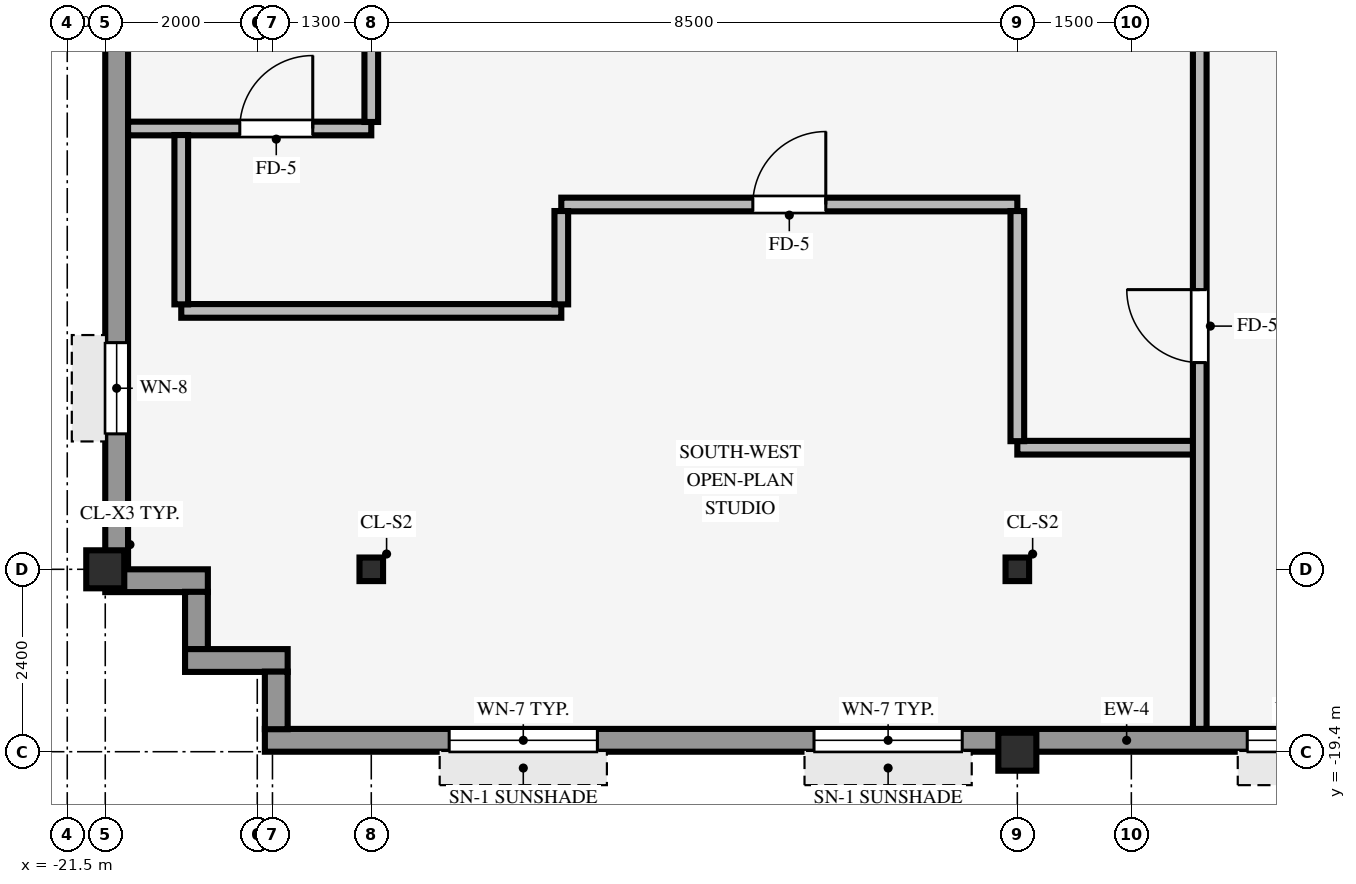
"""IFC4 building model, lengths in metres.
Left out: names, types, materials, properties, quantities, classifications, styles, units other than length and angle.
Written with IfcOpenShell. Run it as: python <this file> out.ifc"""

import sys

from ifc_helpers import new_model, si_unit, direction, frame, frame_2d, origin, origin_2d, place, context, subcontext, project, spatial, rectangle, hollow_rectangle, i_section, extrude, source, transform, mapped, element, fill, save


model = new_model("IFC4")
c1 = context("Model", 3, precision=1e-05, world=origin(), true_north=direction((0.0, 1.0)))
c2 = subcontext(c1, "Body", "Model", "MODEL_VIEW")
j1 = project(units=[si_unit("LENGTHUNIT", "METRE"), si_unit("PLANEANGLEUNIT", "RADIAN")], contexts=[c1])
p1 = place(None, origin())
s1 = spatial("IfcSite", under=j1, at=p1, CompositionType="ELEMENT")
p2 = place(p1, origin())
s2 = spatial("IfcBuilding", under=s1, at=p2, CompositionType="ELEMENT")
p3 = place(p2, frame((0.0, 0.0, 261.6)))
s3 = spatial("IfcBuildingStorey", under=s2, at=p3, CompositionType="ELEMENT", Elevation=261.6)
for number, where, z_axis, x_axis in (
    (1, (-21.0, -17.0, 0.0), (0.0, 0.0, 1.0), (1.0, 0.0, 0.0)),
    (2, (-9.0, -19.4, 0.0), (0.0, 0.0, 1.0), (1.0, 0.0, 0.0)),
):
    element("IfcColumn", number, at=place(p3, frame(where, z_axis=z_axis, x_axis=x_axis)), inside=s3, PredefinedType="COLUMN", context=c2, shape_type="SweptSolid", body=[
        extrude(hollow_rectangle(XDim=0.5, YDim=0.5, WallThickness=0.032, InnerFilletRadius=0.032, OuterFilletRadius=0.064, at=origin_2d()), origin(), (0.0, 0.0, 1.0), 3.37),
    ])
for number, where, z_axis, x_axis in (
    (3, (-17.5, -17.0, 0.0), (0.0, 0.0, 1.0), (1.0, 0.0, 0.0)),
    (4, (-9.0, -17.0, 0.0), (0.0, 0.0, 1.0), (1.0, 0.0, 0.0)),
):
    element("IfcColumn", number, at=place(p3, frame(where, z_axis=z_axis, x_axis=x_axis)), inside=s3, PredefinedType="COLUMN", context=c2, shape_type="SweptSolid", body=[
        extrude(i_section(OverallWidth=0.31, OverallDepth=0.31, WebThickness=0.015, FlangeThickness=0.015, FilletRadius=0.015, at=origin_2d()), origin(), (0.0, 0.0, 1.0), 3.37),
    ])
p4 = place(p3, frame((-18.9, -19.25, 0.0), z_axis=(0.0, 0.0, 1.0), x_axis=(1.0, 0.0, 0.0)))
e5 = element("IfcWall", 5, at=p4, inside=s3, PredefinedType="STANDARD", context=c2, shape_type="SweptSolid", body=[
    extrude(rectangle(XDim=35.6, YDim=0.3, at=frame_2d((17.8, 0.0))), origin(), (0.0, 0.0, 1.0), 2.705),
])
p5 = place(p4, frame((24.15, 0.0, 0.0), z_axis=(0.0, 0.0, 1.0), x_axis=(-1.0, 0.0, 0.0)))
e6 = element("IfcOpeningElement", 6, at=p5, cuts=e5, PredefinedType="OPENING", context=c2, shape_type="SweptSolid", body=[
    extrude(rectangle(XDim=1.05, YDim=2.1, at=frame_2d((0.525, 1.05))), frame((0.0, 0.16, 0.0), z_axis=(0.0, -1.0, 0.0), x_axis=(1.0, 0.0, 0.0)), (0.0, 0.0, 1.0), 0.32),
])
p6 = place(p4, frame((2.425, 0.0, 0.8)))
e7 = element("IfcOpeningElement", 7, at=p6, cuts=e5, PredefinedType="OPENING", context=c2, shape_type="SweptSolid", body=[
    extrude(rectangle(XDim=1.95, YDim=1.48, at=frame_2d((0.975, 0.74))), frame((0.0, 0.16, 0.0), z_axis=(0.0, -1.0, 0.0), x_axis=(1.0, 0.0, 0.0)), (0.0, 0.0, 1.0), 0.32),
])
p7 = place(p4, frame((7.225, 0.0, 0.8)))
e8 = element("IfcOpeningElement", 8, at=p7, cuts=e5, PredefinedType="OPENING", context=c2, shape_type="SweptSolid", body=[
    extrude(rectangle(XDim=1.95, YDim=1.48, at=frame_2d((0.975, 0.74))), frame((0.0, 0.16, 0.0), z_axis=(0.0, -1.0, 0.0), x_axis=(1.0, 0.0, 0.0)), (0.0, 0.0, 1.0), 0.32),
])
p8 = place(p4, frame((12.925, 0.0, 0.8)))
e9 = element("IfcOpeningElement", 9, at=p8, cuts=e5, PredefinedType="OPENING", context=c2, shape_type="SweptSolid", body=[
    extrude(rectangle(XDim=1.95, YDim=1.48, at=frame_2d((0.975, 0.74))), frame((0.0, 0.16, 0.0), z_axis=(0.0, -1.0, 0.0), x_axis=(1.0, 0.0, 0.0)), (0.0, 0.0, 1.0), 0.32),
])
p9 = place(p4, frame((15.475, 0.0, 0.8)))
e10 = element("IfcOpeningElement", 10, at=p9, cuts=e5, PredefinedType="OPENING", context=c2, shape_type="SweptSolid", body=[
    extrude(rectangle(XDim=1.95, YDim=1.48, at=frame_2d((0.975, 0.74))), frame((0.0, 0.16, 0.0), z_axis=(0.0, -1.0, 0.0), x_axis=(1.0, 0.0, 0.0)), (0.0, 0.0, 1.0), 0.32),
])
p10 = place(p4, frame((20.725, 0.0, 0.8)))
e11 = element("IfcOpeningElement", 11, at=p10, cuts=e5, PredefinedType="OPENING", context=c2, shape_type="SweptSolid", body=[
    extrude(rectangle(XDim=1.95, YDim=1.48, at=frame_2d((0.975, 0.74))), frame((0.0, 0.16, 0.0), z_axis=(0.0, -1.0, 0.0), x_axis=(1.0, 0.0, 0.0)), (0.0, 0.0, 1.0), 0.32),
])
p11 = place(p4, frame((31.225, 0.0, 0.8)))
e12 = element("IfcOpeningElement", 12, at=p11, cuts=e5, PredefinedType="OPENING", context=c2, shape_type="SweptSolid", body=[
    extrude(rectangle(XDim=1.95, YDim=1.48, at=frame_2d((0.975, 0.74))), frame((0.0, 0.16, 0.0), z_axis=(0.0, -1.0, 0.0), x_axis=(1.0, 0.0, 0.0)), (0.0, 0.0, 1.0), 0.32),
])
p12 = place(p3, frame((-20.85, -17.004, 0.0), z_axis=(0.0, 0.0, 1.0), x_axis=(0.0, 1.0, 0.0)))
e13 = element("IfcWall", 13, at=p12, inside=s3, PredefinedType="STANDARD", context=c2, shape_type="SweptSolid", body=[
    extrude(rectangle(XDim=34.008, YDim=0.3, at=frame_2d((17.004, 0.0))), origin(), (0.0, 0.0, 1.0), 2.705),
])
p13 = place(p12, frame((1.786, 0.0, 0.8)))
e14 = element("IfcOpeningElement", 14, at=p13, cuts=e13, PredefinedType="OPENING", context=c2, shape_type="SweptSolid", body=[
    extrude(rectangle(XDim=1.2, YDim=1.48, at=frame_2d((0.6, 0.74))), frame((0.0, 0.16, 0.0), z_axis=(0.0, -1.0, 0.0), x_axis=(1.0, 0.0, 0.0)), (0.0, 0.0, 1.0), 0.32),
])
p14 = place(p12, frame((8.159, 0.0, 0.8)))
e15 = element("IfcOpeningElement", 15, at=p14, cuts=e13, PredefinedType="OPENING", context=c2, shape_type="SweptSolid", body=[
    extrude(rectangle(XDim=1.2, YDim=1.48, at=frame_2d((0.6, 0.74))), frame((0.0, 0.16, 0.0), z_axis=(0.0, -1.0, 0.0), x_axis=(1.0, 0.0, 0.0)), (0.0, 0.0, 1.0), 0.32),
])
p15 = place(p12, frame((11.831, 0.0, 0.8)))
e16 = element("IfcOpeningElement", 16, at=p15, cuts=e13, PredefinedType="OPENING", context=c2, shape_type="SweptSolid", body=[
    extrude(rectangle(XDim=1.2, YDim=1.48, at=frame_2d((0.6, 0.74))), frame((0.0, 0.16, 0.0), z_axis=(0.0, -1.0, 0.0), x_axis=(1.0, 0.0, 0.0)), (0.0, 0.0, 1.0), 0.32),
])
p16 = place(p12, frame((17.754, 0.0, 0.8)))
e17 = element("IfcOpeningElement", 17, at=p16, cuts=e13, PredefinedType="OPENING", context=c2, shape_type="SweptSolid", body=[
    extrude(rectangle(XDim=1.2, YDim=1.48, at=frame_2d((0.6, 0.74))), frame((0.0, 0.16, 0.0), z_axis=(0.0, -1.0, 0.0), x_axis=(1.0, 0.0, 0.0)), (0.0, 0.0, 1.0), 0.32),
])
p17 = place(p12, frame((20.977, 0.0, 0.8)))
e18 = element("IfcOpeningElement", 18, at=p17, cuts=e13, PredefinedType="OPENING", context=c2, shape_type="SweptSolid", body=[
    extrude(rectangle(XDim=1.2, YDim=1.48, at=frame_2d((0.6, 0.74))), frame((0.0, 0.16, 0.0), z_axis=(0.0, -1.0, 0.0), x_axis=(1.0, 0.0, 0.0)), (0.0, 0.0, 1.0), 0.32),
])
p18 = place(p12, frame((24.649, 0.0, 0.8)))
e19 = element("IfcOpeningElement", 19, at=p18, cuts=e13, PredefinedType="OPENING", context=c2, shape_type="SweptSolid", body=[
    extrude(rectangle(XDim=1.2, YDim=1.48, at=frame_2d((0.6, 0.74))), frame((0.0, 0.16, 0.0), z_axis=(0.0, -1.0, 0.0), x_axis=(1.0, 0.0, 0.0)), (0.0, 0.0, 1.0), 0.32),
])
p19 = place(p12, frame((31.022, 0.0, 0.8)))
e20 = element("IfcOpeningElement", 20, at=p19, cuts=e13, PredefinedType="OPENING", context=c2, shape_type="SweptSolid", body=[
    extrude(rectangle(XDim=1.2, YDim=1.48, at=frame_2d((0.6, 0.74))), frame((0.0, 0.16, 0.0), z_axis=(0.0, -1.0, 0.0), x_axis=(1.0, 0.0, 0.0)), (0.0, 0.0, 1.0), 0.32),
])
p20 = place(p3, frame((-21.0, -17.15, 0.0), z_axis=(0.0, 0.0, 1.0), x_axis=(1.0, 0.0, 0.0)))
e21 = element("IfcWall", 21, at=p20, inside=s3, PredefinedType="STANDARD", context=c2, shape_type="SweptSolid", body=[
    extrude(rectangle(XDim=1.35, YDim=0.3, at=frame_2d((0.675, 0.0))), origin(), (0.0, 0.0, 1.0), 2.892),
])
p21 = place(p3, frame((-19.8, -18.054, 0.0), z_axis=(0.0, 0.0, 1.0), x_axis=(0.0, 1.0, 0.0)))
e22 = element("IfcWall", 22, at=p21, inside=s3, PredefinedType="STANDARD", context=c2, shape_type="SweptSolid", body=[
    extrude(rectangle(XDim=0.758, YDim=0.3, at=frame_2d((0.379, 0.0))), origin(), (0.0, 0.0, 1.0), 2.892),
])
p22 = place(p3, frame((-19.95, -18.2, 0.0), z_axis=(0.0, 0.0, 1.0), x_axis=(1.0, 0.0, 0.0)))
e23 = element("IfcWall", 23, at=p22, inside=s3, PredefinedType="STANDARD", context=c2, shape_type="SweptSolid", body=[
    extrude(rectangle(XDim=1.35, YDim=0.3, at=frame_2d((0.675, 0.0))), origin(), (0.0, 0.0, 1.0), 2.892),
])
p23 = place(p3, frame((-18.75, -19.104, 0.0), z_axis=(0.0, 0.0, 1.0), x_axis=(0.0, 1.0, 0.0)))
e24 = element("IfcWall", 24, at=p23, inside=s3, PredefinedType="STANDARD", context=c2, shape_type="SweptSolid", body=[
    extrude(rectangle(XDim=0.758, YDim=0.3, at=frame_2d((0.379, 0.0))), origin(), (0.0, 0.0, 1.0), 2.892),
])
p24 = place(p3, frame((-9.0, -15.4, 0.0), z_axis=(0.0, 0.0, 1.0), x_axis=(1.0, 0.0, 0.0)))
e25 = element("IfcWall", 25, at=p24, inside=s3, PredefinedType="PARTITIONING", context=c2, shape_type="SweptSolid", body=[
    extrude(rectangle(XDim=2.324, YDim=0.18, at=frame_2d((1.162, 0.0))), origin(), (0.0, 0.0, 1.0), 3.36),
])
p25 = place(p3, frame((-20.0, -13.6, 0.0), z_axis=(0.0, 0.0, 1.0), x_axis=(1.0, 0.0, 0.0)))
e26 = element("IfcWall", 26, at=p25, inside=s3, PredefinedType="PARTITIONING", context=c2, shape_type="SweptSolid", body=[
    extrude(rectangle(XDim=5.0, YDim=0.18, at=frame_2d((2.5, 0.0))), origin(), (0.0, 0.0, 1.0), 3.038),
])
p26 = place(p3, frame((-15.0, -12.2, 0.0), z_axis=(0.0, 0.0, 1.0), x_axis=(1.0, 0.0, 0.0)))
e27 = element("IfcWall", 27, at=p26, inside=s3, PredefinedType="PARTITIONING", context=c2, shape_type="SweptSolid", body=[
    extrude(rectangle(XDim=6.0, YDim=0.18, at=frame_2d((3.0, 0.0))), origin(), (0.0, 0.0, 1.0), 3.36),
])
p27 = place(p26, frame((2.52, 0.0, 0.0)))
e28 = element("IfcOpeningElement", 28, at=p27, cuts=e27, PredefinedType="OPENING", context=c2, shape_type="SweptSolid", body=[
    extrude(rectangle(XDim=0.96, YDim=2.1, at=frame_2d((0.48, 1.05))), frame((0.0, 0.1, 0.0), z_axis=(0.0, -1.0, 0.0), x_axis=(1.0, 0.0, 0.0)), (0.0, 0.0, 1.0), 0.2),
])
p28 = place(p3, frame((-20.7, -11.2, 0.0), z_axis=(0.0, 0.0, 1.0), x_axis=(1.0, 0.0, 0.0)))
e29 = element("IfcWall", 29, at=p28, inside=s3, PredefinedType="PARTITIONING", context=c2, shape_type="SweptSolid", body=[
    extrude(rectangle(XDim=3.2, YDim=0.18, at=frame_2d((1.6, 0.0))), origin(), (0.0, 0.0, 1.0), 3.36),
])
p29 = place(p28, frame((1.47, 0.0, 0.0)))
e30 = element("IfcOpeningElement", 30, at=p29, cuts=e29, PredefinedType="OPENING", context=c2, shape_type="SweptSolid", body=[
    extrude(rectangle(XDim=0.96, YDim=2.1, at=frame_2d((0.48, 1.05))), frame((0.0, 0.1, 0.0), z_axis=(0.0, -1.0, 0.0), x_axis=(1.0, 0.0, 0.0)), (0.0, 0.0, 1.0), 0.2),
])
p30 = place(p3, frame((-20.0, -13.514, 0.0), z_axis=(0.0, 0.0, 1.0), x_axis=(0.0, 1.0, 0.0)))
e31 = element("IfcWall", 31, at=p30, inside=s3, PredefinedType="PARTITIONING", context=c2, shape_type="SweptSolid", body=[
    extrude(rectangle(XDim=2.228, YDim=0.18, at=frame_2d((1.114, 0.0))), origin(), (0.0, 0.0, 1.0), 3.36),
])
p31 = place(p3, frame((-17.5, -11.114, 0.0), z_axis=(0.0, 0.0, 1.0), x_axis=(0.0, 1.0, 0.0)))
e32 = element("IfcWall", 32, at=p31, inside=s3, PredefinedType="PARTITIONING", context=c2, shape_type="SweptSolid", body=[
    extrude(rectangle(XDim=1.118, YDim=0.18, at=frame_2d((0.559, 0.0))), origin(), (0.0, 0.0, 1.0), 2.892),
])
p32 = place(p3, frame((-15.0, -13.514, 0.0), z_axis=(0.0, 0.0, 1.0), x_axis=(0.0, 1.0, 0.0)))
e33 = element("IfcWall", 33, at=p32, inside=s3, PredefinedType="PARTITIONING", context=c2, shape_type="SweptSolid", body=[
    extrude(rectangle(XDim=1.228, YDim=0.18, at=frame_2d((0.614, 0.0))), origin(), (0.0, 0.0, 1.0), 3.36),
])
p33 = place(p3, frame((-9.0, -15.314, 0.0), z_axis=(0.0, 0.0, 1.0), x_axis=(0.0, 1.0, 0.0)))
e34 = element("IfcWall", 34, at=p33, inside=s3, PredefinedType="PARTITIONING", context=c2, shape_type="SweptSolid", body=[
    extrude(rectangle(XDim=3.028, YDim=0.18, at=frame_2d((1.514, 0.0))), origin(), (0.0, 0.0, 1.0), 2.892),
])
p34 = place(p3, frame((-6.6, -19.1, 0.0), z_axis=(0.0, 0.0, 1.0), x_axis=(0.0, 1.0, 0.0)))
e35 = element("IfcWall", 35, at=p34, inside=s3, PredefinedType="PARTITIONING", context=c2, shape_type="SweptSolid", body=[
    extrude(rectangle(XDim=17.764, YDim=0.18, at=frame_2d((8.882, 0.0))), origin(), (0.0, 0.0, 1.0), 3.36),
])
p35 = place(p34, frame((13.152, 0.0, 0.0)))
e36 = element("IfcOpeningElement", 36, at=p35, cuts=e35, PredefinedType="OPENING", context=c2, shape_type="SweptSolid", body=[
    extrude(rectangle(XDim=0.96, YDim=2.1, at=frame_2d((0.48, 1.05))), frame((0.0, 0.1, 0.0), z_axis=(0.0, -1.0, 0.0), x_axis=(1.0, 0.0, 0.0)), (0.0, 0.0, 1.0), 0.2),
])
p36 = place(p34, frame((4.82, 0.0, 0.0)))
e37 = element("IfcOpeningElement", 37, at=p36, cuts=e35, PredefinedType="OPENING", context=c2, shape_type="SweptSolid", body=[
    extrude(rectangle(XDim=0.96, YDim=2.1, at=frame_2d((0.48, 1.05))), frame((0.0, 0.1, 0.0), z_axis=(0.0, -1.0, 0.0), x_axis=(1.0, 0.0, 0.0)), (0.0, 0.0, 1.0), 0.2),
])
m1 = source(origin(), c2, "Body", "SweptSolid", [
    extrude(rectangle(XDim=1.95, YDim=1.48, at=frame_2d((0.975, 0.74))), frame((0.0, 0.03, 0.0), z_axis=(0.0, -1.0, 0.0), x_axis=(1.0, 0.0, 0.0)), (0.0, 0.0, 1.0), 0.06),
])
p37 = place(p6, origin())
e38 = element("IfcWindow", 38, at=p37, inside=s3, PartitioningType="SINGLE_PANEL", PredefinedType="WINDOW", context=c2, shape_type="MappedRepresentation", body=[
    mapped(m1, transform((0.0, 0.0, 0.0), scale=1.0)),
])
fill(e7, e38)
p38 = place(p7, origin())
e39 = element("IfcWindow", 39, at=p38, inside=s3, PartitioningType="SINGLE_PANEL", PredefinedType="WINDOW", context=c2, shape_type="MappedRepresentation", body=[
    mapped(m1, transform((0.0, 0.0, 0.0), scale=1.0)),
])
fill(e8, e39)
p39 = place(p8, origin())
e40 = element("IfcWindow", 40, at=p39, inside=s3, PartitioningType="SINGLE_PANEL", PredefinedType="WINDOW", context=c2, shape_type="MappedRepresentation", body=[
    mapped(m1, transform((0.0, 0.0, 0.0), scale=1.0)),
])
fill(e9, e40)
m2 = source(origin(), c2, "Body", "SweptSolid", [
    extrude(rectangle(XDim=1.2, YDim=1.48, at=frame_2d((0.6, 0.74))), frame((0.0, 0.03, 0.0), z_axis=(0.0, -1.0, 0.0), x_axis=(1.0, 0.0, 0.0)), (0.0, 0.0, 1.0), 0.06),
])
p40 = place(p13, origin())
e41 = element("IfcWindow", 41, at=p40, inside=s3, PartitioningType="SINGLE_PANEL", PredefinedType="WINDOW", context=c2, shape_type="MappedRepresentation", body=[
    mapped(m2, transform((0.0, 0.0, 0.0), scale=1.0)),
])
fill(e14, e41)
m3 = source(origin(), c2, "Body", "SweptSolid", [
    extrude(rectangle(XDim=0.96, YDim=2.1, at=frame_2d((0.48, 1.05))), frame((0.0, 0.025, 0.0), z_axis=(0.0, -1.0, 0.0), x_axis=(1.0, 0.0, 0.0)), (0.0, 0.0, 1.0), 0.05),
])
p41 = place(p27, origin())
e42 = element("IfcDoor", 42, at=p41, inside=s3, OperationType="SINGLE_SWING_RIGHT", PredefinedType="DOOR", context=c2, shape_type="MappedRepresentation", body=[
    mapped(m3, transform((0.0, 0.0, 0.0), scale=1.0)),
])
fill(e28, e42)
p42 = place(p36, origin())
e43 = element("IfcDoor", 43, at=p42, inside=s3, OperationType="SINGLE_SWING_RIGHT", PredefinedType="DOOR", context=c2, shape_type="MappedRepresentation", body=[
    mapped(m3, transform((0.0, 0.0, 0.0), scale=1.0)),
])
fill(e37, e43)
p43 = place(p29, origin())
e44 = element("IfcDoor", 44, at=p43, inside=s3, OperationType="SINGLE_SWING_RIGHT", PredefinedType="DOOR", context=c2, shape_type="MappedRepresentation", body=[
    mapped(m3, transform((0.0, 0.0, 0.0), scale=1.0)),
])
fill(e30, e44)
save(model, sys.argv[1])
